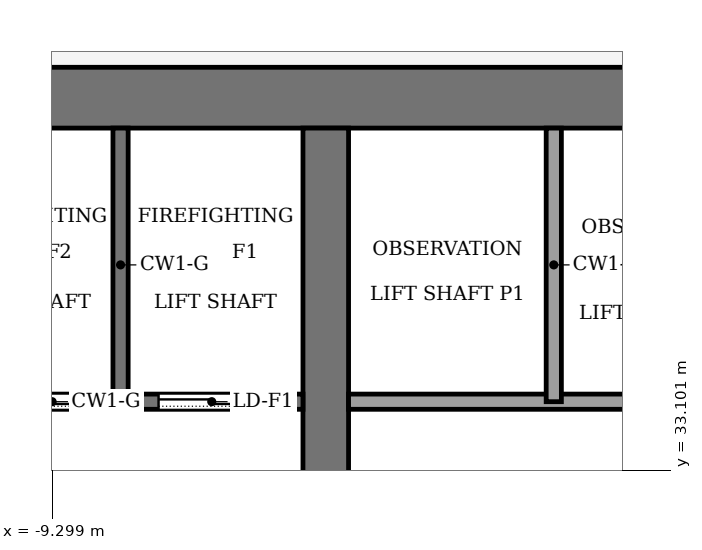
"""IFC4 building model, lengths in metres.
Left out: names, types, materials, properties, quantities, classifications, styles, units other than length and angle.
Written with IfcOpenShell. Run it as: python <this file> out.ifc"""

import sys

from ifc_helpers import new_model, si_unit, direction, frame, frame_2d, origin, place, context, subcontext, project, spatial, rectangle, extrude, element, fill, save


model = new_model("IFC4")
c1 = context("Model", 3, precision=1e-05, world=origin(), true_north=direction((0.0, 1.0)))
c2 = subcontext(c1, "Body", "Model", "MODEL_VIEW")
j1 = project(units=[si_unit("LENGTHUNIT", "METRE"), si_unit("PLANEANGLEUNIT", "RADIAN")], contexts=[c1])
p1 = place(None, origin())
s1 = spatial("IfcSite", under=j1, at=p1, CompositionType="ELEMENT")
p2 = place(p1, origin())
s2 = spatial("IfcBuilding", under=s1, at=p2, CompositionType="ELEMENT")
p3 = place(p2, frame((0.0, 0.0, 242.0)))
s3 = spatial("IfcBuildingStorey", under=s2, at=p3, CompositionType="ELEMENT", Elevation=242.0)
p4 = place(p3, frame((-13.4, 38.0, -0.13), z_axis=(0.0, 0.0, 1.0), x_axis=(1.0, 0.0, 0.0)))
e1 = element("IfcWall", 1, at=p4, inside=s3, PredefinedType="SHEAR", context=c2, shape_type="SweptSolid", body=[
    extrude(rectangle(XDim=26.8, YDim=0.8, at=frame_2d((13.4, 0.0))), origin(), (0.0, 0.0, 1.0), 4.0),
])
p5 = place(p3, frame((-5.7, 18.4, -0.13), z_axis=(0.0, 0.0, 1.0), x_axis=(0.0, 1.0, 0.0)))
e2 = element("IfcWall", 2, at=p5, inside=s3, PredefinedType="SHEAR", context=c2, shape_type="SweptSolid", body=[
    extrude(rectangle(XDim=19.2, YDim=0.6, at=frame_2d((9.6, 0.0))), origin(), (0.0, 0.0, 1.0), 4.0),
])
p6 = place(p5, frame((8.35, 0.0, 0.13)))
e3 = element("IfcOpeningElement", 3, at=p6, cuts=e2, PredefinedType="OPENING", context=c2, shape_type="SweptSolid", body=[
    extrude(rectangle(XDim=0.9, YDim=2.1, at=frame_2d((0.45, 1.05))), frame((0.0, 0.31, 0.0), z_axis=(0.0, -1.0, 0.0), x_axis=(1.0, 0.0, 0.0)), (0.0, 0.0, 1.0), 0.62),
])
p7 = place(p3, frame((-12.6, 34.0, 0.0), z_axis=(0.0, 0.0, 1.0), x_axis=(1.0, 0.0, 0.0)))
e4 = element("IfcWall", 4, at=p7, inside=s3, PredefinedType="PARTITIONING", context=c2, shape_type="SweptSolid", body=[
    extrude(rectangle(XDim=6.6, YDim=0.2, at=frame_2d((3.3, 0.0))), origin(), (0.0, 0.0, 1.0), 3.87),
])
p8 = place(p7, frame((4.7, 0.0, 0.0)))
e5 = element("IfcOpeningElement", 5, at=p8, cuts=e4, PredefinedType="OPENING", context=c2, shape_type="SweptSolid", body=[
    extrude(rectangle(XDim=1.4, YDim=2.2, at=frame_2d((0.7, 1.1))), frame((0.0, 0.11, 0.0), z_axis=(0.0, -1.0, 0.0), x_axis=(1.0, 0.0, 0.0)), (0.0, 0.0, 1.0), 0.22),
])
p9 = place(p7, frame((2.3, 0.0, 0.0)))
e6 = element("IfcOpeningElement", 6, at=p9, cuts=e4, PredefinedType="OPENING", context=c2, shape_type="SweptSolid", body=[
    extrude(rectangle(XDim=1.4, YDim=2.2, at=frame_2d((0.7, 1.1))), frame((0.0, 0.11, 0.0), z_axis=(0.0, -1.0, 0.0), x_axis=(1.0, 0.0, 0.0)), (0.0, 0.0, 1.0), 0.22),
])
p10 = place(p7, frame((0.45, 0.0, 0.0)))
e7 = element("IfcOpeningElement", 7, at=p10, cuts=e4, PredefinedType="OPENING", context=c2, shape_type="SweptSolid", body=[
    extrude(rectangle(XDim=0.9, YDim=2.1, at=frame_2d((0.45, 1.05))), frame((0.0, 0.11, 0.0), z_axis=(0.0, -1.0, 0.0), x_axis=(1.0, 0.0, 0.0)), (0.0, 0.0, 1.0), 0.22),
])
p11 = place(p3, frame((-5.4, 34.0, 0.0), z_axis=(0.0, 0.0, 1.0), x_axis=(1.0, 0.0, 0.0)))
e8 = element("IfcWall", 8, at=p11, inside=s3, PredefinedType="PARTITIONING", context=c2, shape_type="SweptSolid", body=[
    extrude(rectangle(XDim=10.8, YDim=0.2, at=frame_2d((5.4, 0.0))), origin(), (0.0, 0.0, 1.0), 3.87),
])
p12 = place(p11, frame((6.15, 0.0, 0.0)))
e9 = element("IfcOpeningElement", 9, at=p12, cuts=e8, PredefinedType="OPENING", context=c2, shape_type="SweptSolid", body=[
    extrude(rectangle(XDim=1.2, YDim=2.2, at=frame_2d((0.6, 1.1))), frame((0.0, 0.11, 0.0), z_axis=(0.0, -1.0, 0.0), x_axis=(1.0, 0.0, 0.0)), (0.0, 0.0, 1.0), 0.22),
])
p13 = place(p11, frame((8.95, 0.0, 0.0)))
e10 = element("IfcOpeningElement", 10, at=p13, cuts=e8, PredefinedType="OPENING", context=c2, shape_type="SweptSolid", body=[
    extrude(rectangle(XDim=1.0, YDim=2.1, at=frame_2d((0.5, 1.05))), frame((0.0, 0.11, 0.0), z_axis=(0.0, -1.0, 0.0), x_axis=(1.0, 0.0, 0.0)), (0.0, 0.0, 1.0), 0.22),
])
for number, where, z_axis, x_axis in (
    (11, (-8.4, 34.0, 0.0), (0.0, 0.0, 1.0), (0.0, 1.0, 0.0)),
    (12, (-2.7, 34.0, 0.0), (0.0, 0.0, 1.0), (0.0, 1.0, 0.0)),
):
    element("IfcWall", number, at=place(p3, frame(where, z_axis=z_axis, x_axis=x_axis)), inside=s3, PredefinedType="PARTITIONING", context=c2, shape_type="SweptSolid", body=[
        extrude(rectangle(XDim=3.6, YDim=0.2, at=frame_2d((1.8, 0.0))), origin(), (0.0, 0.0, 1.0), 3.87),
    ])
p14 = place(p8, origin())
e13 = element("IfcDoor", 13, at=p14, inside=s3, OperationType="SLIDING_TO_LEFT", PredefinedType="DOOR", context=c2, shape_type="SweptSolid", body=[
    extrude(rectangle(XDim=1.4, YDim=2.2, at=frame_2d((0.7, 1.1))), frame((0.0, 0.025, 0.0), z_axis=(0.0, -1.0, 0.0), x_axis=(1.0, 0.0, 0.0)), (0.0, 0.0, 1.0), 0.05),
])
fill(e5, e13)
p15 = place(p9, origin())
e14 = element("IfcDoor", 14, at=p15, inside=s3, OperationType="SLIDING_TO_LEFT", PredefinedType="DOOR", context=c2, shape_type="SweptSolid", body=[
    extrude(rectangle(XDim=1.4, YDim=2.2, at=frame_2d((0.7, 1.1))), frame((0.0, 0.025, 0.0), z_axis=(0.0, -1.0, 0.0), x_axis=(1.0, 0.0, 0.0)), (0.0, 0.0, 1.0), 0.05),
])
fill(e6, e14)
save(model, sys.argv[1])
